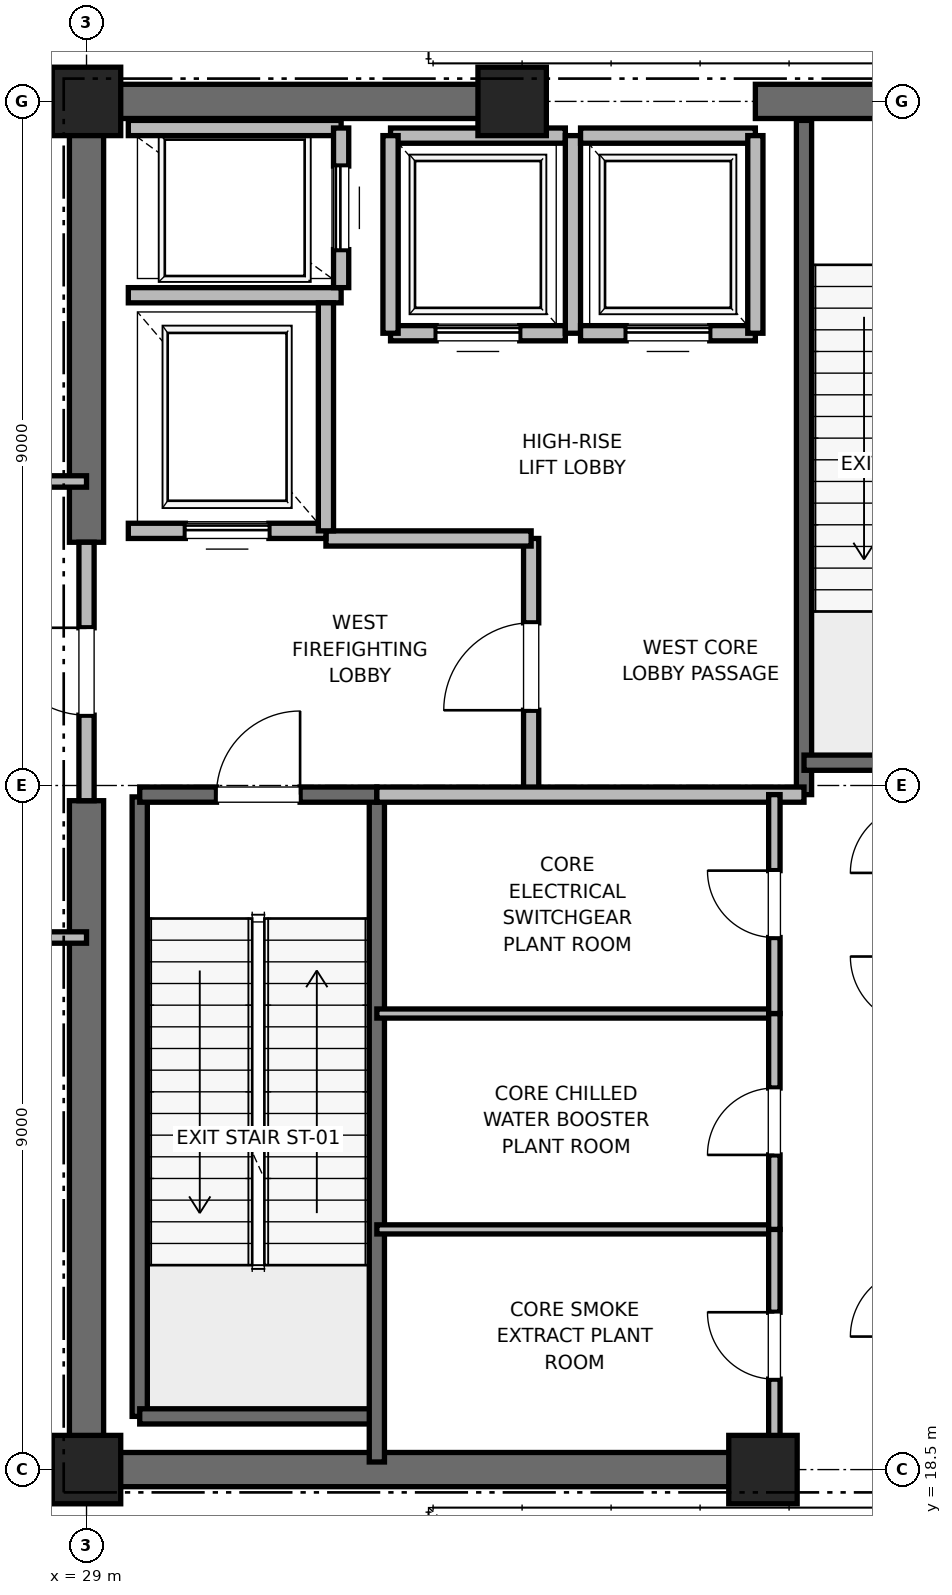
"""IFC4 building model, lengths in metres.
Left out: names, types, materials, properties, quantities, classifications, styles, units other than length and angle.
Written with IfcOpenShell. Run it as: python <this file> out.ifc"""

import sys

from ifc_helpers import new_model, si_unit, direction, frame, frame_2d, origin, origin_2d, place, context, subcontext, project, spatial, rectangle, extrude, element, fill, save


model = new_model("IFC4")
c1 = context("Model", 3, precision=1e-05, world=origin(), true_north=direction((0.0, 1.0)))
c2 = subcontext(c1, "Body", "Model", "MODEL_VIEW")
j1 = project(units=[si_unit("LENGTHUNIT", "METRE"), si_unit("PLANEANGLEUNIT", "RADIAN")], contexts=[c1])
p1 = place(None, origin())
s1 = spatial("IfcSite", under=j1, at=p1, CompositionType="ELEMENT")
p2 = place(p1, origin())
s2 = spatial("IfcBuilding", under=s1, at=p2, CompositionType="ELEMENT")
p3 = place(p2, frame((0.0, 0.0, 295.2)))
s3 = spatial("IfcBuildingStorey", under=s2, at=p3, CompositionType="ELEMENT", Elevation=295.2)
for number, where, z_axis, x_axis in (
    (1, (29.0, 18.5, 0.0), (0.0, 0.0, 1.0), (1.0, 0.0, 0.0)),
    (2, (29.0, 36.5, 0.0), (0.0, 0.0, 1.0), (1.0, 0.0, 0.0)),
    (3, (37.9, 18.5, 0.0), (0.0, 0.0, 1.0), (1.0, 0.0, 0.0)),
    (4, (34.6, 36.5, 0.0), (0.0, 0.0, 1.0), (1.0, 0.0, 0.0)),
):
    element("IfcColumn", number, at=place(p3, frame(where, z_axis=z_axis, x_axis=x_axis)), inside=s3, PredefinedType="PILASTER", context=c2, shape_type="SweptSolid", body=[
        extrude(rectangle(XDim=0.9, YDim=0.9, at=origin_2d()), origin(), (0.0, 0.0, 1.0), 5.8),
    ])
p4 = place(p3, frame((29.0, 18.5, 0.0), z_axis=(0.0, 0.0, 1.0), x_axis=(1.0, 0.0, 0.0)))
e5 = element("IfcWall", 5, at=p4, inside=s3, PredefinedType="SHEAR", context=c2, shape_type="SweptSolid", body=[
    extrude(rectangle(XDim=9.2, YDim=0.45, at=frame_2d((4.6, 0.0))), origin(), (0.0, 0.0, 1.0), 5.5),
])
p5 = place(p3, frame((29.0, 36.5, 0.0), z_axis=(0.0, 0.0, 1.0), x_axis=(1.0, 0.0, 0.0)))
e6 = element("IfcWall", 6, at=p5, inside=s3, PredefinedType="SHEAR", context=c2, shape_type="SweptSolid", body=[
    extrude(rectangle(XDim=5.8, YDim=0.45, at=frame_2d((2.9, 0.0))), origin(), (0.0, 0.0, 1.0), 5.5),
])
p6 = place(p3, frame((37.8, 36.5, 0.0), z_axis=(0.0, 0.0, 1.0), x_axis=(1.0, 0.0, 0.0)))
e7 = element("IfcWall", 7, at=p6, inside=s3, PredefinedType="SHEAR", context=c2, shape_type="SweptSolid", body=[
    extrude(rectangle(XDim=4.4, YDim=0.45, at=frame_2d((2.2, 0.0))), origin(), (0.0, 0.0, 1.0), 5.5),
])
p7 = place(p6, frame((1.65, 0.0, 0.0)))
e8 = element("IfcOpeningElement", 8, at=p7, cuts=e7, PredefinedType="OPENING", context=c2, shape_type="SweptSolid", body=[
    extrude(rectangle(XDim=1.1, YDim=2.15, at=frame_2d((0.55, 1.075))), frame((0.0, 0.225, 0.0), z_axis=(0.0, -1.0, 0.0), x_axis=(1.0, 0.0, 0.0)), (0.0, 0.0, 1.0), 0.45),
])
p8 = place(p3, frame((29.0, 18.5, 0.0), z_axis=(0.0, 0.0, 1.0), x_axis=(0.0, 1.0, 0.0)))
e9 = element("IfcWall", 9, at=p8, inside=s3, PredefinedType="SHEAR", context=c2, shape_type="SweptSolid", body=[
    extrude(rectangle(XDim=8.8, YDim=0.45, at=frame_2d((4.4, 0.0))), origin(), (0.0, 0.0, 1.0), 5.5),
])
p9 = place(p3, frame((29.0, 30.7, 0.0), z_axis=(0.0, 0.0, 1.0), x_axis=(0.0, 1.0, 0.0)))
e10 = element("IfcWall", 10, at=p9, inside=s3, PredefinedType="SHEAR", context=c2, shape_type="SweptSolid", body=[
    extrude(rectangle(XDim=5.8, YDim=0.45, at=frame_2d((2.9, 0.0))), origin(), (0.0, 0.0, 1.0), 5.5),
])
p10 = place(p3, frame((29.7, 19.2, 0.0), z_axis=(0.0, 0.0, 1.0), x_axis=(0.0, 1.0, 0.0)))
e11 = element("IfcWall", 11, at=p10, inside=s3, PredefinedType="SOLIDWALL", context=c2, shape_type="SweptSolid", body=[
    extrude(rectangle(XDim=8.15, YDim=0.2, at=frame_2d((4.075, 0.0))), origin(), (0.0, 0.0, 1.0), 5.5),
])
p11 = place(p3, frame((29.7, 19.2, 0.0), z_axis=(0.0, 0.0, 1.0), x_axis=(1.0, 0.0, 0.0)))
e12 = element("IfcWall", 12, at=p11, inside=s3, PredefinedType="SOLIDWALL", context=c2, shape_type="SweptSolid", body=[
    extrude(rectangle(XDim=3.12, YDim=0.2, at=frame_2d((1.56, 0.0))), origin(), (0.0, 0.0, 1.0), 5.5),
])
p12 = place(p3, frame((32.82, 18.6, 0.0), z_axis=(0.0, 0.0, 1.0), x_axis=(0.0, 1.0, 0.0)))
e13 = element("IfcWall", 13, at=p12, inside=s3, PredefinedType="SOLIDWALL", context=c2, shape_type="SweptSolid", body=[
    extrude(rectangle(XDim=8.78, YDim=0.2, at=frame_2d((4.39, 0.0))), origin(), (0.0, 0.0, 1.0), 5.5),
])
p13 = place(p3, frame((29.7, 27.38, 0.0), z_axis=(0.0, 0.0, 1.0), x_axis=(1.0, 0.0, 0.0)))
e14 = element("IfcWall", 14, at=p13, inside=s3, PredefinedType="SOLIDWALL", context=c2, shape_type="SweptSolid", body=[
    extrude(rectangle(XDim=3.12, YDim=0.2, at=frame_2d((1.56, 0.0))), origin(), (0.0, 0.0, 1.0), 5.5),
])
p14 = place(p13, frame((1.01, 0.0, 0.0)))
e15 = element("IfcOpeningElement", 15, at=p14, cuts=e14, PredefinedType="OPENING", context=c2, shape_type="SweptSolid", body=[
    extrude(rectangle(XDim=1.1, YDim=2.15, at=frame_2d((0.55, 1.075))), frame((0.0, 0.1, 0.0), z_axis=(0.0, -1.0, 0.0), x_axis=(1.0, 0.0, 0.0)), (0.0, 0.0, 1.0), 0.2),
])
p15 = place(p3, frame((38.44, 27.38, 0.0), z_axis=(0.0, 0.0, 1.0), x_axis=(0.0, 1.0, 0.0)))
e16 = element("IfcWall", 16, at=p15, inside=s3, PredefinedType="SOLIDWALL", context=c2, shape_type="SweptSolid", body=[
    extrude(rectangle(XDim=8.87, YDim=0.2, at=frame_2d((4.435, 0.0))), origin(), (0.0, 0.0, 1.0), 5.5),
])
p16 = place(p3, frame((38.44, 27.8, 0.0), z_axis=(0.0, 0.0, 1.0), x_axis=(1.0, 0.0, 0.0)))
e17 = element("IfcWall", 17, at=p16, inside=s3, PredefinedType="SOLIDWALL", context=c2, shape_type="SweptSolid", body=[
    extrude(rectangle(XDim=3.32, YDim=0.2, at=frame_2d((1.66, 0.0))), origin(), (0.0, 0.0, 1.0), 5.5),
])
p17 = place(p3, frame((34.85, 27.38, 0.0), z_axis=(0.0, 0.0, 1.0), x_axis=(0.0, 1.0, 0.0)))
e18 = element("IfcWall", 18, at=p17, inside=s3, PredefinedType="PARTITIONING", context=c2, shape_type="SweptSolid", body=[
    extrude(rectangle(XDim=3.37, YDim=0.2, at=frame_2d((1.685, 0.0))), origin(), (0.0, 0.0, 1.0), 5.5),
])
p18 = place(p17, frame((1.11, 0.0, 0.0)))
e19 = element("IfcOpeningElement", 19, at=p18, cuts=e18, PredefinedType="OPENING", context=c2, shape_type="SweptSolid", body=[
    extrude(rectangle(XDim=1.15, YDim=2.2, at=frame_2d((0.575, 1.1))), frame((0.0, 0.1, 0.0), z_axis=(0.0, -1.0, 0.0), x_axis=(1.0, 0.0, 0.0)), (0.0, 0.0, 1.0), 0.2),
])
p19 = place(p3, frame((29.0, 27.3, 0.0), z_axis=(0.0, 0.0, 1.0), x_axis=(0.0, 1.0, 0.0)))
e20 = element("IfcWall", 20, at=p19, inside=s3, PredefinedType="PARTITIONING", context=c2, shape_type="SweptSolid", body=[
    extrude(rectangle(XDim=3.4, YDim=0.2, at=frame_2d((1.7, 0.0))), origin(), (0.0, 0.0, 1.0), 4.58),
])
p20 = place(p19, frame((1.125, 0.0, 0.0)))
e21 = element("IfcOpeningElement", 21, at=p20, cuts=e20, PredefinedType="OPENING", context=c2, shape_type="SweptSolid", body=[
    extrude(rectangle(XDim=1.15, YDim=2.2, at=frame_2d((0.575, 1.1))), frame((0.0, 0.1, 0.0), z_axis=(0.0, -1.0, 0.0), x_axis=(1.0, 0.0, 0.0)), (0.0, 0.0, 1.0), 0.2),
])
p21 = place(p3, frame((32.82, 27.38, 0.0), z_axis=(0.0, 0.0, 1.0), x_axis=(1.0, 0.0, 0.0)))
e22 = element("IfcWall", 22, at=p21, inside=s3, PredefinedType="PARTITIONING", context=c2, shape_type="SweptSolid", body=[
    extrude(rectangle(XDim=5.62, YDim=0.2, at=frame_2d((2.81, 0.0))), origin(), (0.0, 0.0, 1.0), 5.5),
])
p22 = place(p3, frame((32.15, 30.75, 0.0), z_axis=(0.0, 0.0, 1.0), x_axis=(1.0, 0.0, 0.0)))
e23 = element("IfcWall", 23, at=p22, inside=s3, PredefinedType="PARTITIONING", context=c2, shape_type="SweptSolid", body=[
    extrude(rectangle(XDim=2.7, YDim=0.2, at=frame_2d((1.35, 0.0))), origin(), (0.0, 0.0, 1.0), 5.5),
])
p23 = place(p3, frame((29.55, 30.85, 0.0), z_axis=(0.0, 0.0, 1.0), x_axis=(1.0, 0.0, 0.0)))
e24 = element("IfcWall", 24, at=p23, inside=s3, PredefinedType="SOLIDWALL", context=c2, shape_type="SweptSolid", body=[
    extrude(rectangle(XDim=2.6, YDim=0.2, at=frame_2d((1.3, 0.0))), origin(), (0.0, 0.0, 1.0), 4.58),
])
p24 = place(p23, frame((0.75, 0.0, 0.0)))
e25 = element("IfcOpeningElement", 25, at=p24, cuts=e24, PredefinedType="OPENING", context=c2, shape_type="SweptSolid", body=[
    extrude(rectangle(XDim=1.1, YDim=2.2, at=frame_2d((0.55, 1.1))), frame((0.0, 0.1, 0.0), z_axis=(0.0, -1.0, 0.0), x_axis=(1.0, 0.0, 0.0)), (0.0, 0.0, 1.0), 0.2),
])
p25 = place(p3, frame((29.55, 33.95, 0.0), z_axis=(0.0, 0.0, 1.0), x_axis=(1.0, 0.0, 0.0)))
e26 = element("IfcWall", 26, at=p25, inside=s3, PredefinedType="SOLIDWALL", context=c2, shape_type="SweptSolid", body=[
    extrude(rectangle(XDim=2.8, YDim=0.2, at=frame_2d((1.4, 0.0))), origin(), (0.0, 0.0, 1.0), 5.5),
])
p26 = place(p3, frame((32.15, 30.85, 0.0), z_axis=(0.0, 0.0, 1.0), x_axis=(0.0, 1.0, 0.0)))
e27 = element("IfcWall", 27, at=p26, inside=s3, PredefinedType="SOLIDWALL", context=c2, shape_type="SweptSolid", body=[
    extrude(rectangle(XDim=3.0, YDim=0.2, at=frame_2d((1.5, 0.0))), origin(), (0.0, 0.0, 1.0), 5.5),
])
p27 = place(p3, frame((32.35, 36.15, 0.0), z_axis=(0.0, 0.0, 1.0), x_axis=(-1.0, 0.0, 0.0)))
e28 = element("IfcWall", 28, at=p27, inside=s3, PredefinedType="SOLIDWALL", context=c2, shape_type="SweptSolid", body=[
    extrude(rectangle(XDim=2.8, YDim=0.2, at=frame_2d((1.4, 0.0))), origin(), (0.0, 0.0, 1.0), 4.553),
])
p28 = place(p3, frame((32.35, 34.05, 0.0), z_axis=(0.0, 0.0, 1.0), x_axis=(0.0, 1.0, 0.0)))
e29 = element("IfcWall", 29, at=p28, inside=s3, PredefinedType="SOLIDWALL", context=c2, shape_type="SweptSolid", body=[
    extrude(rectangle(XDim=2.1, YDim=0.2, at=frame_2d((1.05, 0.0))), origin(), (0.0, 0.0, 1.0), 5.5),
])
p29 = place(p28, frame((0.5, 0.0, 0.0)))
e30 = element("IfcOpeningElement", 30, at=p29, cuts=e29, PredefinedType="OPENING", context=c2, shape_type="SweptSolid", body=[
    extrude(rectangle(XDim=1.1, YDim=2.2, at=frame_2d((0.55, 1.1))), frame((0.0, 0.1, 0.0), z_axis=(0.0, -1.0, 0.0), x_axis=(1.0, 0.0, 0.0)), (0.0, 0.0, 1.0), 0.2),
])
p30 = place(p3, frame((33.0, 33.45, 0.0), z_axis=(0.0, 0.0, 1.0), x_axis=(1.0, 0.0, 0.0)))
e31 = element("IfcWall", 31, at=p30, inside=s3, PredefinedType="SOLIDWALL", context=c2, shape_type="SweptSolid", body=[
    extrude(rectangle(XDim=2.3, YDim=0.2, at=frame_2d((1.15, 0.0))), origin(), (0.0, 0.0, 1.0), 5.5),
])
p31 = place(p30, frame((0.6, 0.0, 0.0)))
e32 = element("IfcOpeningElement", 32, at=p31, cuts=e31, PredefinedType="OPENING", context=c2, shape_type="SweptSolid", body=[
    extrude(rectangle(XDim=1.1, YDim=2.2, at=frame_2d((0.55, 1.1))), frame((0.0, 0.1, 0.0), z_axis=(0.0, -1.0, 0.0), x_axis=(1.0, 0.0, 0.0)), (0.0, 0.0, 1.0), 0.2),
])
p32 = place(p3, frame((35.3, 36.05, 0.0), z_axis=(0.0, 0.0, 1.0), x_axis=(-1.0, 0.0, 0.0)))
e33 = element("IfcWall", 33, at=p32, inside=s3, PredefinedType="SOLIDWALL", context=c2, shape_type="SweptSolid", body=[
    extrude(rectangle(XDim=2.3, YDim=0.2, at=frame_2d((1.15, 0.0))), origin(), (0.0, 0.0, 1.0), 4.58),
])
p33 = place(p3, frame((33.0, 36.05, 0.0), z_axis=(0.0, 0.0, 1.0), x_axis=(0.0, -1.0, 0.0)))
e34 = element("IfcWall", 34, at=p33, inside=s3, PredefinedType="SOLIDWALL", context=c2, shape_type="SweptSolid", body=[
    extrude(rectangle(XDim=2.6, YDim=0.2, at=frame_2d((1.3, 0.0))), origin(), (0.0, 0.0, 1.0), 5.5),
])
p34 = place(p3, frame((35.4, 33.45, 0.0), z_axis=(0.0, 0.0, 1.0), x_axis=(0.0, 1.0, 0.0)))
e35 = element("IfcWall", 35, at=p34, inside=s3, PredefinedType="SOLIDWALL", context=c2, shape_type="SweptSolid", body=[
    extrude(rectangle(XDim=2.6, YDim=0.2, at=frame_2d((1.3, 0.0))), origin(), (0.0, 0.0, 1.0), 4.58),
])
p35 = place(p3, frame((35.5, 33.45, 0.0), z_axis=(0.0, 0.0, 1.0), x_axis=(1.0, 0.0, 0.0)))
e36 = element("IfcWall", 36, at=p35, inside=s3, PredefinedType="SOLIDWALL", context=c2, shape_type="SweptSolid", body=[
    extrude(rectangle(XDim=2.3, YDim=0.2, at=frame_2d((1.15, 0.0))), origin(), (0.0, 0.0, 1.0), 5.5),
])
p36 = place(p35, frame((0.6, 0.0, 0.0)))
e37 = element("IfcOpeningElement", 37, at=p36, cuts=e36, PredefinedType="OPENING", context=c2, shape_type="SweptSolid", body=[
    extrude(rectangle(XDim=1.1, YDim=2.2, at=frame_2d((0.55, 1.1))), frame((0.0, 0.1, 0.0), z_axis=(0.0, -1.0, 0.0), x_axis=(1.0, 0.0, 0.0)), (0.0, 0.0, 1.0), 0.2),
])
p37 = place(p3, frame((37.8, 36.05, 0.0), z_axis=(0.0, 0.0, 1.0), x_axis=(-1.0, 0.0, 0.0)))
e38 = element("IfcWall", 38, at=p37, inside=s3, PredefinedType="SOLIDWALL", context=c2, shape_type="SweptSolid", body=[
    extrude(rectangle(XDim=2.3, YDim=0.2, at=frame_2d((1.15, 0.0))), origin(), (0.0, 0.0, 1.0), 4.58),
])
p38 = place(p3, frame((37.8, 33.45, 0.0), z_axis=(0.0, 0.0, 1.0), x_axis=(0.0, 1.0, 0.0)))
e39 = element("IfcWall", 39, at=p38, inside=s3, PredefinedType="SOLIDWALL", context=c2, shape_type="SweptSolid", body=[
    extrude(rectangle(XDim=2.6, YDim=0.2, at=frame_2d((1.3, 0.0))), origin(), (0.0, 0.0, 1.0), 4.58),
])
for number, where, z_axis, x_axis in (
    (40, (32.82, 21.66, 0.0), (0.0, 0.0, 1.0), (1.0, 0.0, 0.0)),
    (41, (32.82, 24.5, 0.0), (0.0, 0.0, 1.0), (1.0, 0.0, 0.0)),
):
    element("IfcWall", number, at=place(p3, frame(where, z_axis=z_axis, x_axis=x_axis)), inside=s3, PredefinedType="PARTITIONING", context=c2, shape_type="SweptSolid", body=[
        extrude(rectangle(XDim=5.23, YDim=0.12, at=frame_2d((2.615, 0.0))), origin(), (0.0, 0.0, 1.0), 2.85),
    ])
p39 = place(p3, frame((38.05, 18.6, 0.0), z_axis=(0.0, 0.0, 1.0), x_axis=(0.0, 1.0, 0.0)))
e42 = element("IfcWall", 42, at=p39, inside=s3, PredefinedType="PARTITIONING", context=c2, shape_type="SweptSolid", body=[
    extrude(rectangle(XDim=3.06, YDim=0.15, at=frame_2d((1.53, 0.0))), origin(), (0.0, 0.0, 1.0), 2.85),
])
p40 = place(p39, frame((1.09, 0.0, 0.0)))
e43 = element("IfcOpeningElement", 43, at=p40, cuts=e42, PredefinedType="OPENING", context=c2, shape_type="SweptSolid", body=[
    extrude(rectangle(XDim=0.88, YDim=2.1, at=frame_2d((0.44, 1.05))), frame((0.0, 0.075, 0.0), z_axis=(0.0, -1.0, 0.0), x_axis=(1.0, 0.0, 0.0)), (0.0, 0.0, 1.0), 0.15),
])
p41 = place(p3, frame((38.05, 21.66, 0.0), z_axis=(0.0, 0.0, 1.0), x_axis=(0.0, 1.0, 0.0)))
e44 = element("IfcWall", 44, at=p41, inside=s3, PredefinedType="PARTITIONING", context=c2, shape_type="SweptSolid", body=[
    extrude(rectangle(XDim=2.84, YDim=0.15, at=frame_2d((1.42, 0.0))), origin(), (0.0, 0.0, 1.0), 2.85),
])
p42 = place(p41, frame((0.98, 0.0, 0.0)))
e45 = element("IfcOpeningElement", 45, at=p42, cuts=e44, PredefinedType="OPENING", context=c2, shape_type="SweptSolid", body=[
    extrude(rectangle(XDim=0.88, YDim=2.1, at=frame_2d((0.44, 1.05))), frame((0.0, 0.075, 0.0), z_axis=(0.0, -1.0, 0.0), x_axis=(1.0, 0.0, 0.0)), (0.0, 0.0, 1.0), 0.15),
])
p43 = place(p3, frame((38.05, 24.5, 0.0), z_axis=(0.0, 0.0, 1.0), x_axis=(0.0, 1.0, 0.0)))
e46 = element("IfcWall", 46, at=p43, inside=s3, PredefinedType="PARTITIONING", context=c2, shape_type="SweptSolid", body=[
    extrude(rectangle(XDim=2.88, YDim=0.15, at=frame_2d((1.44, 0.0))), origin(), (0.0, 0.0, 1.0), 2.85),
])
p44 = place(p43, frame((1.0, 0.0, 0.0)))
e47 = element("IfcOpeningElement", 47, at=p44, cuts=e46, PredefinedType="OPENING", context=c2, shape_type="SweptSolid", body=[
    extrude(rectangle(XDim=0.88, YDim=2.1, at=frame_2d((0.44, 1.05))), frame((0.0, 0.075, 0.0), z_axis=(0.0, -1.0, 0.0), x_axis=(1.0, 0.0, 0.0)), (0.0, 0.0, 1.0), 0.15),
])
p45 = place(p3, frame((26.0, 25.5, 0.0), z_axis=(0.0, 0.0, 1.0), x_axis=(1.0, 0.0, 0.0)))
e48 = element("IfcWall", 48, at=p45, inside=s3, PredefinedType="PARTITIONING", context=c2, shape_type="SweptSolid", body=[
    extrude(rectangle(XDim=3.0, YDim=0.15, at=frame_2d((1.5, 0.0))), origin(), (0.0, 0.0, 1.0), 2.85),
])
p46 = place(p45, frame((1.025, 0.0, 0.0)))
e49 = element("IfcOpeningElement", 49, at=p46, cuts=e48, PredefinedType="OPENING", context=c2, shape_type="SweptSolid", body=[
    extrude(rectangle(XDim=0.95, YDim=2.15, at=frame_2d((0.475, 1.075))), frame((0.0, 0.075, 0.0), z_axis=(0.0, -1.0, 0.0), x_axis=(1.0, 0.0, 0.0)), (0.0, 0.0, 1.0), 0.15),
])
p47 = place(p3, frame((26.0, 31.5, 0.0), z_axis=(0.0, 0.0, 1.0), x_axis=(1.0, 0.0, 0.0)))
e50 = element("IfcWall", 50, at=p47, inside=s3, PredefinedType="PARTITIONING", context=c2, shape_type="SweptSolid", body=[
    extrude(rectangle(XDim=3.0, YDim=0.15, at=frame_2d((1.5, 0.0))), origin(), (0.0, 0.0, 1.0), 2.85),
])
p48 = place(p47, frame((1.025, 0.0, 0.0)))
e51 = element("IfcOpeningElement", 51, at=p48, cuts=e50, PredefinedType="OPENING", context=c2, shape_type="SweptSolid", body=[
    extrude(rectangle(XDim=0.95, YDim=2.15, at=frame_2d((0.475, 1.075))), frame((0.0, 0.075, 0.0), z_axis=(0.0, -1.0, 0.0), x_axis=(1.0, 0.0, 0.0)), (0.0, 0.0, 1.0), 0.15),
])
p49 = place(p14, origin())
e52 = element("IfcDoor", 52, at=p49, inside=s3, OperationType="SINGLE_SWING_RIGHT", PredefinedType="DOOR", context=c2, shape_type="SweptSolid", body=[
    extrude(rectangle(XDim=1.1, YDim=2.15, at=frame_2d((0.55, 1.075))), frame((0.0, 0.025, 0.0), z_axis=(0.0, -1.0, 0.0), x_axis=(1.0, 0.0, 0.0)), (0.0, 0.0, 1.0), 0.05),
])
fill(e15, e52)
p50 = place(p18, origin())
e53 = element("IfcDoor", 53, at=p50, inside=s3, OperationType="SINGLE_SWING_LEFT", PredefinedType="DOOR", context=c2, shape_type="SweptSolid", body=[
    extrude(rectangle(XDim=1.15, YDim=2.2, at=frame_2d((0.575, 1.1))), frame((0.0, 0.025, 0.0), z_axis=(0.0, -1.0, 0.0), x_axis=(1.0, 0.0, 0.0)), (0.0, 0.0, 1.0), 0.05),
])
fill(e19, e53)
p51 = place(p20, origin())
e54 = element("IfcDoor", 54, at=p51, inside=s3, OperationType="SINGLE_SWING_RIGHT", PredefinedType="DOOR", context=c2, shape_type="SweptSolid", body=[
    extrude(rectangle(XDim=1.15, YDim=2.2, at=frame_2d((0.575, 1.1))), frame((0.0, 0.025, 0.0), z_axis=(0.0, -1.0, 0.0), x_axis=(1.0, 0.0, 0.0)), (0.0, 0.0, 1.0), 0.05),
])
fill(e21, e54)
p52 = place(p24, origin())
e55 = element("IfcDoor", 55, at=p52, inside=s3, OperationType="SLIDING_TO_RIGHT", PredefinedType="DOOR", context=c2, shape_type="SweptSolid", body=[
    extrude(rectangle(XDim=1.1, YDim=2.2, at=frame_2d((0.55, 1.1))), frame((0.0, 0.025, 0.0), z_axis=(0.0, -1.0, 0.0), x_axis=(1.0, 0.0, 0.0)), (0.0, 0.0, 1.0), 0.05),
])
fill(e25, e55)
p53 = place(p29, origin())
e56 = element("IfcDoor", 56, at=p53, inside=s3, OperationType="SLIDING_TO_RIGHT", PredefinedType="DOOR", context=c2, shape_type="SweptSolid", body=[
    extrude(rectangle(XDim=1.1, YDim=2.2, at=frame_2d((0.55, 1.1))), frame((0.0, 0.025, 0.0), z_axis=(0.0, -1.0, 0.0), x_axis=(1.0, 0.0, 0.0)), (0.0, 0.0, 1.0), 0.05),
])
fill(e30, e56)
p54 = place(p31, origin())
e57 = element("IfcDoor", 57, at=p54, inside=s3, OperationType="SLIDING_TO_RIGHT", PredefinedType="DOOR", context=c2, shape_type="SweptSolid", body=[
    extrude(rectangle(XDim=1.1, YDim=2.2, at=frame_2d((0.55, 1.1))), frame((0.0, 0.025, 0.0), z_axis=(0.0, -1.0, 0.0), x_axis=(1.0, 0.0, 0.0)), (0.0, 0.0, 1.0), 0.05),
])
fill(e32, e57)
p55 = place(p36, origin())
e58 = element("IfcDoor", 58, at=p55, inside=s3, OperationType="SLIDING_TO_RIGHT", PredefinedType="DOOR", context=c2, shape_type="SweptSolid", body=[
    extrude(rectangle(XDim=1.1, YDim=2.2, at=frame_2d((0.55, 1.1))), frame((0.0, 0.025, 0.0), z_axis=(0.0, -1.0, 0.0), x_axis=(1.0, 0.0, 0.0)), (0.0, 0.0, 1.0), 0.05),
])
fill(e37, e58)
p56 = place(p40, origin())
e59 = element("IfcDoor", 59, at=p56, inside=s3, OperationType="SINGLE_SWING_RIGHT", PredefinedType="DOOR", context=c2, shape_type="SweptSolid", body=[
    extrude(rectangle(XDim=0.88, YDim=2.1, at=frame_2d((0.44, 1.05))), frame((0.0, 0.025, 0.0), z_axis=(0.0, -1.0, 0.0), x_axis=(1.0, 0.0, 0.0)), (0.0, 0.0, 1.0), 0.05),
])
fill(e43, e59)
p57 = place(p42, origin())
e60 = element("IfcDoor", 60, at=p57, inside=s3, OperationType="SINGLE_SWING_LEFT", PredefinedType="DOOR", context=c2, shape_type="SweptSolid", body=[
    extrude(rectangle(XDim=0.88, YDim=2.1, at=frame_2d((0.44, 1.05))), frame((0.0, 0.025, 0.0), z_axis=(0.0, -1.0, 0.0), x_axis=(1.0, 0.0, 0.0)), (0.0, 0.0, 1.0), 0.05),
])
fill(e45, e60)
p58 = place(p44, origin())
e61 = element("IfcDoor", 61, at=p58, inside=s3, OperationType="SINGLE_SWING_RIGHT", PredefinedType="DOOR", context=c2, shape_type="SweptSolid", body=[
    extrude(rectangle(XDim=0.88, YDim=2.1, at=frame_2d((0.44, 1.05))), frame((0.0, 0.025, 0.0), z_axis=(0.0, -1.0, 0.0), x_axis=(1.0, 0.0, 0.0)), (0.0, 0.0, 1.0), 0.05),
])
fill(e47, e61)
save(model, sys.argv[1])
